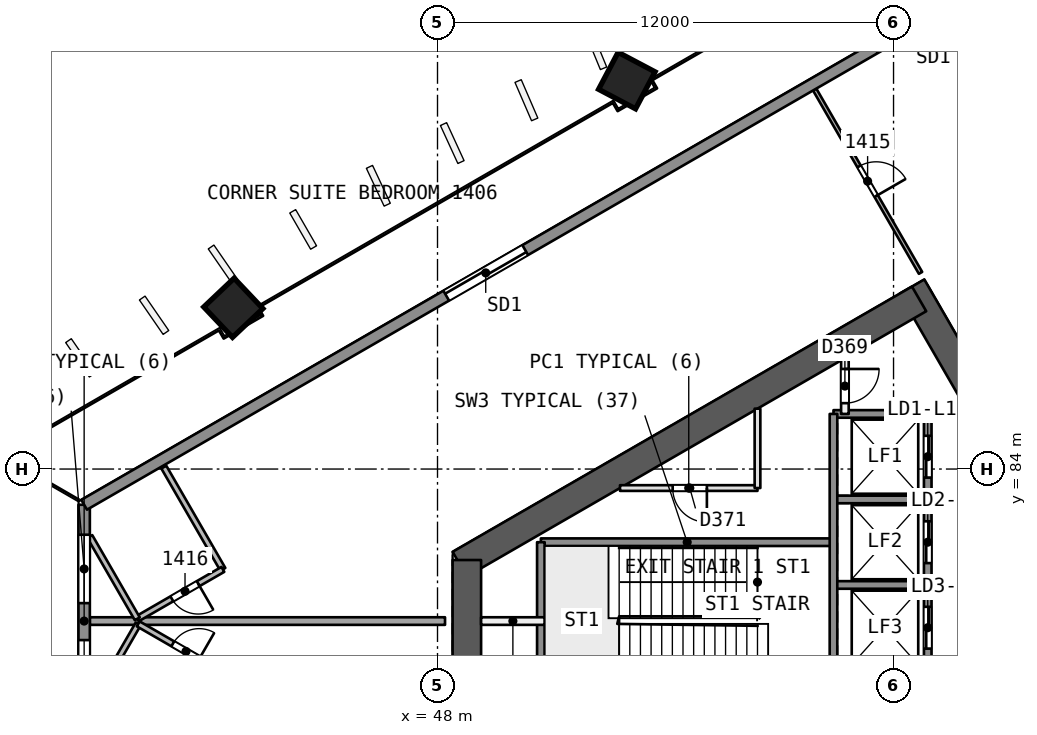
"""IFC4 building model, lengths in metres.
Left out: names, types, materials, properties, quantities, classifications, styles, units other than length and angle.
Written with IfcOpenShell. Run it as: python <this file> out.ifc"""

import sys

from ifc_helpers import new_model, si_unit, direction, frame, frame_2d, origin, origin_2d, place, context, subcontext, project, spatial, rectangle, extrude, element, fill, save


model = new_model("IFC4")
c1 = context("Model", 3, precision=1e-05, world=origin(), true_north=direction((0.0, 1.0)))
c2 = subcontext(c1, "Body", "Model", "MODEL_VIEW")
j1 = project(units=[si_unit("LENGTHUNIT", "METRE"), si_unit("PLANEANGLEUNIT", "RADIAN")], contexts=[c1])
p1 = place(None, origin())
s1 = spatial("IfcSite", under=j1, at=p1, CompositionType="ELEMENT")
p2 = place(p1, origin())
s2 = spatial("IfcBuilding", under=s1, at=p2, CompositionType="ELEMENT")
p3 = place(p2, frame((0.0, 0.0, 64.7)))
s3 = spatial("IfcBuildingStorey", under=s2, at=p3, CompositionType="ELEMENT", Elevation=64.7)
p4 = place(p3, frame((65.567, 80.0, 0.0), z_axis=(0.0, 0.0, 1.0), x_axis=(-0.499988615364, 0.866031976607, 0.0)))
e1 = element("IfcWall", 1, at=p4, inside=s3, PredefinedType="SHEAR", context=c2, shape_type="SweptSolid", body=[
    extrude(rectangle(XDim=10.163, YDim=0.75, at=frame_2d((5.082, 0.0))), origin(), (0.0, 0.0, 1.0), 3.7),
])
p5 = place(p4, frame((0.733, 0.0, 0.0)))
e2 = element("IfcOpeningElement", 2, at=p5, cuts=e1, PredefinedType="OPENING", context=c2, shape_type="SweptSolid", body=[
    extrude(rectangle(XDim=1.2, YDim=2.1, at=frame_2d((0.6, 1.05))), frame((0.0, 0.385, 0.0), z_axis=(0.0, -1.0, 0.0), x_axis=(1.0, 0.0, 0.0)), (0.0, 0.0, 1.0), 0.771),
])
p6 = place(p3, frame((60.673, 88.477, 0.0), z_axis=(0.0, 0.0, 1.0), x_axis=(-0.8660248072, -0.500001033313, 0.0)))
e3 = element("IfcWall", 3, at=p6, inside=s3, PredefinedType="SHEAR", context=c2, shape_type="SweptSolid", body=[
    extrude(rectangle(XDim=13.958, YDim=0.75, at=frame_2d((6.979, 0.0))), origin(), (0.0, 0.0, 1.0), 3.7),
])
p7 = place(p3, frame((48.772, 81.606, 0.0), z_axis=(0.0, 0.0, 1.0), x_axis=(0.0, -1.0, 0.0)))
e4 = element("IfcWall", 4, at=p7, inside=s3, PredefinedType="SHEAR", context=c2, shape_type="SweptSolid", body=[
    extrude(rectangle(XDim=3.429, YDim=0.75, at=frame_2d((1.714, 0.0))), origin(), (0.0, 0.0, 1.0), 3.7),
])
p8 = place(p3, frame((60.673, 71.523, 0.0), z_axis=(0.0, 0.0, 1.0), x_axis=(0.499997052475, 0.866027105532, 0.0)))
e5 = element("IfcWall", 5, at=p8, inside=s3, PredefinedType="SHEAR", context=c2, shape_type="SweptSolid", body=[
    extrude(rectangle(XDim=10.005, YDim=0.75, at=frame_2d((5.002, 0.0))), origin(), (0.0, 0.0, 1.0), 3.7),
])
p9 = place(p8, frame((7.855, 0.0, 0.0)))
e6 = element("IfcOpeningElement", 6, at=p9, cuts=e5, PredefinedType="OPENING", context=c2, shape_type="SweptSolid", body=[
    extrude(rectangle(XDim=1.2, YDim=2.1, at=frame_2d((0.6, 1.05))), frame((0.0, 0.385, 0.0), z_axis=(0.0, -1.0, 0.0), x_axis=(1.0, 0.0, 0.0)), (0.0, 0.0, 1.0), 0.771),
])
p10 = place(p3, frame((52.959, 94.236, 0.0), z_axis=(0.019328501455, -0.012204002625, 0.999738701537), x_axis=(-0.498096589224, 0.866885952098, 0.020212220507)))
e7 = element("IfcColumn", 7, at=p10, inside=s3, PredefinedType="COLUMN", context=c2, shape_type="SweptSolid", body=[
    extrude(rectangle(XDim=1.1, YDim=1.1, at=origin_2d()), origin(), (0.0, 0.0, 1.0), 3.701),
])
p11 = place(p3, frame((42.593, 88.251, 0.0), z_axis=(0.02855911485, -0.006793507689, 0.999569019734), x_axis=(-0.500405785832, 0.865555785013, 0.020180003373)))
e8 = element("IfcColumn", 8, at=p11, inside=s3, PredefinedType="COLUMN", context=c2, shape_type="SweptSolid", body=[
    extrude(rectangle(XDim=1.1, YDim=1.1, at=origin_2d()), origin(), (0.0, 0.0, 1.0), 3.702),
])
p12 = place(p3, frame((57.925, 93.987, 0.0), z_axis=(0.0, 0.0, 1.0), x_axis=(0.499994302092, -0.866028693448, 0.0)))
e9 = element("IfcWall", 9, at=p12, inside=s3, PredefinedType="PARTITIONING", context=c2, shape_type="SweptSolid", body=[
    extrude(rectangle(XDim=5.571, YDim=0.1, at=frame_2d((2.786, 0.0))), origin(), (0.0, 0.0, 1.0), 3.2),
])
p13 = place(p12, frame((2.336, 0.0, 0.0)))
e10 = element("IfcOpeningElement", 10, at=p13, cuts=e9, PredefinedType="OPENING", context=c2, shape_type="SweptSolid", body=[
    extrude(rectangle(XDim=0.9, YDim=2.1, at=frame_2d((0.45, 1.05))), frame((0.0, 0.061, 0.0), z_axis=(0.0, -1.0, 0.0), x_axis=(1.0, 0.0, 0.0)), (0.0, 0.0, 1.0), 0.121),
])
p14 = place(p3, frame((40.798, 84.051, 0.0), z_axis=(0.0, 0.0, 1.0), x_axis=(0.49992418947, -0.86606916859, 0.0)))
e11 = element("IfcWall", 11, at=p14, inside=s3, PredefinedType="PARTITIONING", context=c2, shape_type="SweptSolid", body=[
    extrude(rectangle(XDim=3.108, YDim=0.15, at=frame_2d((1.554, 0.0))), origin(), (0.0, 0.0, 1.0), 3.2),
])
p15 = place(p3, frame((42.352, 81.36, 0.0), z_axis=(0.0, 0.0, 1.0), x_axis=(-0.865997922154, -0.500047596559, 0.0)))
e12 = element("IfcWall", 12, at=p15, inside=s3, PredefinedType="PARTITIONING", context=c2, shape_type="SweptSolid", body=[
    extrude(rectangle(XDim=2.6, YDim=0.15, at=frame_2d((1.3, 0.0))), origin(), (0.0, 0.0, 1.0), 3.2),
])
p16 = place(p15, frame((0.75, 0.0, 0.0)))
e13 = element("IfcOpeningElement", 13, at=p16, cuts=e12, PredefinedType="OPENING", context=c2, shape_type="SweptSolid", body=[
    extrude(rectangle(XDim=0.8, YDim=2.1, at=frame_2d((0.4, 1.05))), frame((0.0, 0.085, 0.0), z_axis=(0.0, -1.0, 0.0), x_axis=(1.0, 0.0, 0.0)), (0.0, 0.0, 1.0), 0.171),
])
p17 = place(p3, frame((40.1, 80.06, 0.0), z_axis=(0.0, 0.0, 1.0), x_axis=(-0.499973274517, 0.866040833199, 0.0)))
e14 = element("IfcWall", 14, at=p17, inside=s3, PredefinedType="PARTITIONING", context=c2, shape_type="SweptSolid", body=[
    extrude(rectangle(XDim=2.5, YDim=0.15, at=frame_2d((1.25, 0.0))), origin(), (0.0, 0.0, 1.0), 3.2),
])
p18 = place(p3, frame((38.851, 80.0, 0.0), z_axis=(0.0, 0.0, 1.0), x_axis=(1.0, 0.0, 0.0)))
e15 = element("IfcWall", 15, at=p18, inside=s3, PredefinedType="PARTITIONING", context=c2, shape_type="SweptSolid", body=[
    extrude(rectangle(XDim=9.347, YDim=0.2, at=frame_2d((4.674, 0.0))), origin(), (0.0, 0.0, 1.0), 3.2),
])
p19 = place(p3, frame((38.851, 77.718, 0.0), z_axis=(0.0, 0.0, 1.0), x_axis=(0.499960079661, 0.866048450576, 0.0)))
e16 = element("IfcWall", 16, at=p19, inside=s3, PredefinedType="PARTITIONING", context=c2, shape_type="SweptSolid", body=[
    extrude(rectangle(XDim=2.55, YDim=0.15, at=frame_2d((1.275, 0.0))), origin(), (0.0, 0.0, 1.0), 3.2),
])
p20 = place(p3, frame((40.125, 79.926, 0.0), z_axis=(0.0, 0.0, 1.0), x_axis=(0.866062058628, -0.499936506574, 0.0)))
e17 = element("IfcWall", 17, at=p20, inside=s3, PredefinedType="PARTITIONING", context=c2, shape_type="SweptSolid", body=[
    extrude(rectangle(XDim=2.6, YDim=0.15, at=frame_2d((1.3, 0.0))), origin(), (0.0, 0.0, 1.0), 3.2),
])
p21 = place(p20, frame((1.05, 0.0, 0.0)))
e18 = element("IfcOpeningElement", 18, at=p21, cuts=e17, PredefinedType="OPENING", context=c2, shape_type="SweptSolid", body=[
    extrude(rectangle(XDim=0.8, YDim=2.1, at=frame_2d((0.4, 1.05))), frame((0.0, 0.085, 0.0), z_axis=(0.0, -1.0, 0.0), x_axis=(1.0, 0.0, 0.0)), (0.0, 0.0, 1.0), 0.171),
])
p22 = place(p3, frame((38.701, 76.94, 0.0), z_axis=(0.0, 0.0, 1.0), x_axis=(0.0, 1.0, 0.0)))
e19 = element("IfcWall", 19, at=p22, inside=s3, PredefinedType="SOLIDWALL", context=c2, shape_type="SweptSolid", body=[
    extrude(rectangle(XDim=6.121, YDim=0.3, at=frame_2d((3.06, 0.0))), origin(), (0.0, 0.0, 1.0), 3.2),
])
p23 = place(p22, frame((3.532, 0.0, 0.9)))
e20 = element("IfcOpeningElement", 20, at=p23, cuts=e19, PredefinedType="OPENING", context=c2, shape_type="SweptSolid", body=[
    extrude(rectangle(XDim=1.8, YDim=1.5, at=frame_2d((0.9, 0.75))), frame((0.0, 0.161, 0.0), z_axis=(0.0, -1.0, 0.0), x_axis=(1.0, 0.0, 0.0)), (0.0, 0.0, 1.0), 0.321),
])
p24 = place(p22, frame((0.76, 0.0, 0.9)))
e21 = element("IfcOpeningElement", 21, at=p24, cuts=e19, PredefinedType="OPENING", context=c2, shape_type="SweptSolid", body=[
    extrude(rectangle(XDim=1.8, YDim=1.5, at=frame_2d((0.9, 0.75))), frame((0.0, 0.161, 0.0), z_axis=(0.0, -1.0, 0.0), x_axis=(1.0, 0.0, 0.0)), (0.0, 0.0, 1.0), 0.321),
])
p25 = place(p3, frame((38.701, 83.06, 0.0), z_axis=(0.0, 0.0, 1.0), x_axis=(0.866026049211, 0.499998882086, 0.0)))
e22 = element("IfcWall", 22, at=p25, inside=s3, PredefinedType="SOLIDWALL", context=c2, shape_type="SweptSolid", body=[
    extrude(rectangle(XDim=59.811, YDim=0.3, at=frame_2d((29.905, 0.0))), origin(), (0.0, 0.0, 1.0), 3.2),
])
p26 = place(p25, frame((33.382, 0.0, 0.0)))
e23 = element("IfcOpeningElement", 23, at=p26, cuts=e22, PredefinedType="OPENING", context=c2, shape_type="SweptSolid", body=[
    extrude(rectangle(XDim=2.4, YDim=2.4, at=frame_2d((1.2, 1.2))), frame((0.0, 0.161, 0.0), z_axis=(0.0, -1.0, 0.0), x_axis=(1.0, 0.0, 0.0)), (0.0, 0.0, 1.0), 0.321),
])
p27 = place(p25, frame((46.394, 0.0, 0.0)))
e24 = element("IfcOpeningElement", 24, at=p27, cuts=e22, PredefinedType="OPENING", context=c2, shape_type="SweptSolid", body=[
    extrude(rectangle(XDim=2.4, YDim=2.4, at=frame_2d((1.2, 1.2))), frame((0.0, 0.161, 0.0), z_axis=(0.0, -1.0, 0.0), x_axis=(1.0, 0.0, 0.0)), (0.0, 0.0, 1.0), 0.321),
])
p28 = place(p25, frame((24.029, 0.0, 0.0)))
e25 = element("IfcOpeningElement", 25, at=p28, cuts=e22, PredefinedType="OPENING", context=c2, shape_type="SweptSolid", body=[
    extrude(rectangle(XDim=2.4, YDim=2.4, at=frame_2d((1.2, 1.2))), frame((0.0, 0.161, 0.0), z_axis=(0.0, -1.0, 0.0), x_axis=(1.0, 0.0, 0.0)), (0.0, 0.0, 1.0), 0.321),
])
p29 = place(p25, frame((11.002, 0.0, 0.0)))
e26 = element("IfcOpeningElement", 26, at=p29, cuts=e22, PredefinedType="OPENING", context=c2, shape_type="SweptSolid", body=[
    extrude(rectangle(XDim=2.4, YDim=2.4, at=frame_2d((1.2, 1.2))), frame((0.0, 0.161, 0.0), z_axis=(0.0, -1.0, 0.0), x_axis=(1.0, 0.0, 0.0)), (0.0, 0.0, 1.0), 0.321),
])
p30 = place(p25, frame((28.705, 0.0, 0.0)))
e27 = element("IfcOpeningElement", 27, at=p30, cuts=e22, PredefinedType="OPENING", context=c2, shape_type="SweptSolid", body=[
    extrude(rectangle(XDim=2.4, YDim=2.4, at=frame_2d((1.2, 1.2))), frame((0.0, 0.161, 0.0), z_axis=(0.0, -1.0, 0.0), x_axis=(1.0, 0.0, 0.0)), (0.0, 0.0, 1.0), 0.321),
])
p31 = place(p3, frame((60.9, 85.45, 0.0), z_axis=(0.0, 0.0, 1.0), x_axis=(-1.0, 0.0, 0.0)))
e28 = element("IfcWall", 28, at=p31, inside=s3, PredefinedType="SOLIDWALL", context=c2, shape_type="SweptSolid", body=[
    extrude(rectangle(XDim=2.48, YDim=0.2, at=frame_2d((1.24, 0.0))), origin(), (0.0, 0.0, 1.0), 3.2),
])
p32 = place(p3, frame((56.42, 83.5, 0.0), z_axis=(0.0, 0.0, 1.0), x_axis=(-1.0, 0.0, 0.0)))
e29 = element("IfcWall", 29, at=p32, inside=s3, PredefinedType="PARTITIONING", context=c2, shape_type="SweptSolid", body=[
    extrude(rectangle(XDim=3.618, YDim=0.15, at=frame_2d((1.809, 0.0))), origin(), (0.0, 0.0, 1.0), 3.2),
])
p33 = place(p32, frame((1.332, 0.0, 0.0)))
e30 = element("IfcOpeningElement", 30, at=p33, cuts=e29, PredefinedType="OPENING", context=c2, shape_type="SweptSolid", body=[
    extrude(rectangle(XDim=0.9, YDim=2.1, at=frame_2d((0.45, 1.05))), frame((0.0, 0.085, 0.0), z_axis=(0.0, -1.0, 0.0), x_axis=(1.0, 0.0, 0.0)), (0.0, 0.0, 1.0), 0.171),
])
p34 = place(p3, frame((60.9, 83.2, 0.0), z_axis=(0.0, 0.0, 1.0), x_axis=(-1.0, 0.0, 0.0)))
e31 = element("IfcWall", 31, at=p34, inside=s3, PredefinedType="SOLIDWALL", context=c2, shape_type="SweptSolid", body=[
    extrude(rectangle(XDim=2.48, YDim=0.2, at=frame_2d((1.24, 0.0))), origin(), (0.0, 0.0, 1.0), 3.2),
])
p35 = place(p3, frame((58.42, 82.075, 0.0), z_axis=(0.0, 0.0, 1.0), x_axis=(-1.0, 0.0, 0.0)))
e32 = element("IfcWall", 32, at=p35, inside=s3, PredefinedType="SOLIDWALL", context=c2, shape_type="SweptSolid", body=[
    extrude(rectangle(XDim=7.7, YDim=0.2, at=frame_2d((3.85, 0.0))), origin(), (0.0, 0.0, 1.0), 3.2),
])
p36 = place(p3, frame((60.9, 80.95, 0.0), z_axis=(0.0, 0.0, 1.0), x_axis=(-1.0, 0.0, 0.0)))
e33 = element("IfcWall", 33, at=p36, inside=s3, PredefinedType="SOLIDWALL", context=c2, shape_type="SweptSolid", body=[
    extrude(rectangle(XDim=2.48, YDim=0.2, at=frame_2d((1.24, 0.0))), origin(), (0.0, 0.0, 1.0), 3.2),
])
p37 = place(p3, frame((50.82, 80.0, 0.0), z_axis=(0.0, 0.0, 1.0), x_axis=(-1.0, 0.0, 0.0)))
e34 = element("IfcWall", 34, at=p37, inside=s3, PredefinedType="PARTITIONING", context=c2, shape_type="SweptSolid", body=[
    extrude(rectangle(XDim=1.673, YDim=0.2, at=frame_2d((0.836, 0.0))), origin(), (0.0, 0.0, 1.0), 3.2),
])
p38 = place(p3, frame((60.9, 85.45, 0.0), z_axis=(0.0, 0.0, 1.0), x_axis=(0.0, -1.0, 0.0)))
e35 = element("IfcWall", 35, at=p38, inside=s3, PredefinedType="SOLIDWALL", context=c2, shape_type="SweptSolid", body=[
    extrude(rectangle(XDim=10.9, YDim=0.2, at=frame_2d((5.45, 0.0))), origin(), (0.0, 0.0, 1.0), 3.2),
])
p39 = place(p38, frame((0.575, 0.0, 0.0)))
e36 = element("IfcOpeningElement", 36, at=p39, cuts=e35, PredefinedType="OPENING", context=c2, shape_type="SweptSolid", body=[
    extrude(rectangle(XDim=1.1, YDim=2.1, at=frame_2d((0.55, 1.05))), frame((0.0, 0.11, 0.0), z_axis=(0.0, -1.0, 0.0), x_axis=(1.0, 0.0, 0.0)), (0.0, 0.0, 1.0), 0.221),
])
p40 = place(p38, frame((2.825, 0.0, 0.0)))
e37 = element("IfcOpeningElement", 37, at=p40, cuts=e35, PredefinedType="OPENING", context=c2, shape_type="SweptSolid", body=[
    extrude(rectangle(XDim=1.1, YDim=2.1, at=frame_2d((0.55, 1.05))), frame((0.0, 0.11, 0.0), z_axis=(0.0, -1.0, 0.0), x_axis=(1.0, 0.0, 0.0)), (0.0, 0.0, 1.0), 0.221),
])
p41 = place(p38, frame((5.075, 0.0, 0.0)))
e38 = element("IfcOpeningElement", 38, at=p41, cuts=e35, PredefinedType="OPENING", context=c2, shape_type="SweptSolid", body=[
    extrude(rectangle(XDim=1.1, YDim=2.1, at=frame_2d((0.55, 1.05))), frame((0.0, 0.11, 0.0), z_axis=(0.0, -1.0, 0.0), x_axis=(1.0, 0.0, 0.0)), (0.0, 0.0, 1.0), 0.221),
])
p42 = place(p38, frame((7.325, 0.0, 0.0)))
e39 = element("IfcOpeningElement", 39, at=p42, cuts=e35, PredefinedType="OPENING", context=c2, shape_type="SweptSolid", body=[
    extrude(rectangle(XDim=1.1, YDim=2.1, at=frame_2d((0.55, 1.05))), frame((0.0, 0.11, 0.0), z_axis=(0.0, -1.0, 0.0), x_axis=(1.0, 0.0, 0.0)), (0.0, 0.0, 1.0), 0.221),
])
p43 = place(p3, frame((58.72, 86.917, 0.0), z_axis=(0.0, 0.0, 1.0), x_axis=(0.0, -1.0, 0.0)))
e40 = element("IfcWall", 40, at=p43, inside=s3, PredefinedType="PARTITIONING", context=c2, shape_type="SweptSolid", body=[
    extrude(rectangle(XDim=1.467, YDim=0.2, at=frame_2d((0.733, 0.0))), origin(), (0.0, 0.0, 1.0), 3.2),
])
p44 = place(p43, frame((0.283, 0.0, 0.0)))
e41 = element("IfcOpeningElement", 41, at=p44, cuts=e40, PredefinedType="OPENING", context=c2, shape_type="SweptSolid", body=[
    extrude(rectangle(XDim=0.9, YDim=2.1, at=frame_2d((0.45, 1.05))), frame((0.0, 0.11, 0.0), z_axis=(0.0, -1.0, 0.0), x_axis=(1.0, 0.0, 0.0)), (0.0, 0.0, 1.0), 0.221),
])
p45 = place(p3, frame((58.42, 85.45, 0.0), z_axis=(0.0, 0.0, 1.0), x_axis=(0.0, -1.0, 0.0)))
e42 = element("IfcWall", 42, at=p45, inside=s3, PredefinedType="SOLIDWALL", context=c2, shape_type="SweptSolid", body=[
    extrude(rectangle(XDim=9.0, YDim=0.2, at=frame_2d((4.5, 0.0))), origin(), (0.0, 0.0, 1.0), 3.2),
])
p46 = place(p3, frame((56.42, 85.589, 0.0), z_axis=(0.0, 0.0, 1.0), x_axis=(0.0, -1.0, 0.0)))
e43 = element("IfcWall", 43, at=p46, inside=s3, PredefinedType="PARTITIONING", context=c2, shape_type="SweptSolid", body=[
    extrude(rectangle(XDim=2.089, YDim=0.15, at=frame_2d((1.044, 0.0))), origin(), (0.0, 0.0, 1.0), 3.2),
])
p47 = place(p3, frame((50.72, 82.075, 0.0), z_axis=(0.0, 0.0, 1.0), x_axis=(0.0, -1.0, 0.0)))
e44 = element("IfcWall", 44, at=p47, inside=s3, PredefinedType="SOLIDWALL", context=c2, shape_type="SweptSolid", body=[
    extrude(rectangle(XDim=4.15, YDim=0.2, at=frame_2d((2.075, 0.0))), origin(), (0.0, 0.0, 1.0), 3.2),
])
p48 = place(p13, origin())
e45 = element("IfcDoor", 45, at=p48, inside=s3, OperationType="SINGLE_SWING_RIGHT", PredefinedType="NOTDEFINED", context=c2, shape_type="SweptSolid", body=[
    extrude(rectangle(XDim=0.9, YDim=2.1, at=frame_2d((0.45, 1.05))), frame((0.0, 0.025, 0.0), z_axis=(0.0, -1.0, 0.0), x_axis=(1.0, 0.0, 0.0)), (0.0, 0.0, 1.0), 0.05),
])
fill(e10, e45)
p49 = place(p16, origin())
e46 = element("IfcDoor", 46, at=p49, inside=s3, OperationType="SINGLE_SWING_LEFT", PredefinedType="NOTDEFINED", context=c2, shape_type="SweptSolid", body=[
    extrude(rectangle(XDim=0.8, YDim=2.1, at=frame_2d((0.4, 1.05))), frame((0.0, 0.025, 0.0), z_axis=(0.0, -1.0, 0.0), x_axis=(1.0, 0.0, 0.0)), (0.0, 0.0, 1.0), 0.05),
])
fill(e13, e46)
p50 = place(p21, origin())
e47 = element("IfcDoor", 47, at=p50, inside=s3, OperationType="SINGLE_SWING_RIGHT", PredefinedType="NOTDEFINED", context=c2, shape_type="SweptSolid", body=[
    extrude(rectangle(XDim=0.8, YDim=2.1, at=frame_2d((0.4, 1.05))), frame((0.0, 0.025, 0.0), z_axis=(0.0, -1.0, 0.0), x_axis=(1.0, 0.0, 0.0)), (0.0, 0.0, 1.0), 0.05),
])
fill(e18, e47)
p51 = place(p23, origin())
e48 = element("IfcWindow", 48, at=p51, inside=s3, PartitioningType="SINGLE_PANEL", PredefinedType="WINDOW", context=c2, shape_type="SweptSolid", body=[
    extrude(rectangle(XDim=1.8, YDim=1.5, at=frame_2d((0.9, 0.75))), frame((0.0, 0.03, 0.0), z_axis=(0.0, -1.0, 0.0), x_axis=(1.0, 0.0, 0.0)), (0.0, 0.0, 1.0), 0.06),
])
fill(e20, e48)
p52 = place(p24, origin())
e49 = element("IfcWindow", 49, at=p52, inside=s3, PartitioningType="SINGLE_PANEL", PredefinedType="WINDOW", context=c2, shape_type="SweptSolid", body=[
    extrude(rectangle(XDim=1.8, YDim=1.5, at=frame_2d((0.9, 0.75))), frame((0.0, 0.03, 0.0), z_axis=(0.0, -1.0, 0.0), x_axis=(1.0, 0.0, 0.0)), (0.0, 0.0, 1.0), 0.06),
])
fill(e21, e49)
p53 = place(p29, origin())
e50 = element("IfcDoor", 50, at=p53, inside=s3, OperationType="SLIDING_TO_RIGHT", PredefinedType="NOTDEFINED", context=c2, shape_type="SweptSolid", body=[
    extrude(rectangle(XDim=2.4, YDim=2.4, at=frame_2d((1.2, 1.2))), frame((0.0, 0.025, 0.0), z_axis=(0.0, -1.0, 0.0), x_axis=(1.0, 0.0, 0.0)), (0.0, 0.0, 1.0), 0.05),
])
fill(e26, e50)
p54 = place(p39, origin())
e51 = element("IfcDoor", 51, at=p54, inside=s3, OperationType="SLIDING_TO_RIGHT", PredefinedType="NOTDEFINED", context=c2, shape_type="SweptSolid", body=[
    extrude(rectangle(XDim=1.1, YDim=2.1, at=frame_2d((0.55, 1.05))), frame((0.0, 0.025, 0.0), z_axis=(0.0, -1.0, 0.0), x_axis=(1.0, 0.0, 0.0)), (0.0, 0.0, 1.0), 0.05),
])
fill(e36, e51)
p55 = place(p40, origin())
e52 = element("IfcDoor", 52, at=p55, inside=s3, OperationType="SLIDING_TO_LEFT", PredefinedType="NOTDEFINED", context=c2, shape_type="SweptSolid", body=[
    extrude(rectangle(XDim=1.1, YDim=2.1, at=frame_2d((0.55, 1.05))), frame((0.0, 0.025, 0.0), z_axis=(0.0, -1.0, 0.0), x_axis=(1.0, 0.0, 0.0)), (0.0, 0.0, 1.0), 0.05),
])
fill(e37, e52)
p56 = place(p41, origin())
e53 = element("IfcDoor", 53, at=p56, inside=s3, OperationType="SLIDING_TO_RIGHT", PredefinedType="NOTDEFINED", context=c2, shape_type="SweptSolid", body=[
    extrude(rectangle(XDim=1.1, YDim=2.1, at=frame_2d((0.55, 1.05))), frame((0.0, 0.025, 0.0), z_axis=(0.0, -1.0, 0.0), x_axis=(1.0, 0.0, 0.0)), (0.0, 0.0, 1.0), 0.05),
])
fill(e38, e53)
p57 = place(p44, origin())
e54 = element("IfcDoor", 54, at=p57, inside=s3, OperationType="SINGLE_SWING_LEFT", PredefinedType="NOTDEFINED", context=c2, shape_type="SweptSolid", body=[
    extrude(rectangle(XDim=0.9, YDim=2.1, at=frame_2d((0.45, 1.05))), frame((0.0, 0.025, 0.0), z_axis=(0.0, -1.0, 0.0), x_axis=(1.0, 0.0, 0.0)), (0.0, 0.0, 1.0), 0.05),
])
fill(e41, e54)
p58 = place(p33, origin())
e55 = element("IfcDoor", 55, at=p58, inside=s3, OperationType="SINGLE_SWING_LEFT", PredefinedType="NOTDEFINED", context=c2, shape_type="SweptSolid", body=[
    extrude(rectangle(XDim=0.9, YDim=2.1, at=frame_2d((0.45, 1.05))), frame((0.0, 0.025, 0.0), z_axis=(0.0, -1.0, 0.0), x_axis=(1.0, 0.0, 0.0)), (0.0, 0.0, 1.0), 0.05),
])
fill(e30, e55)
save(model, sys.argv[1])
